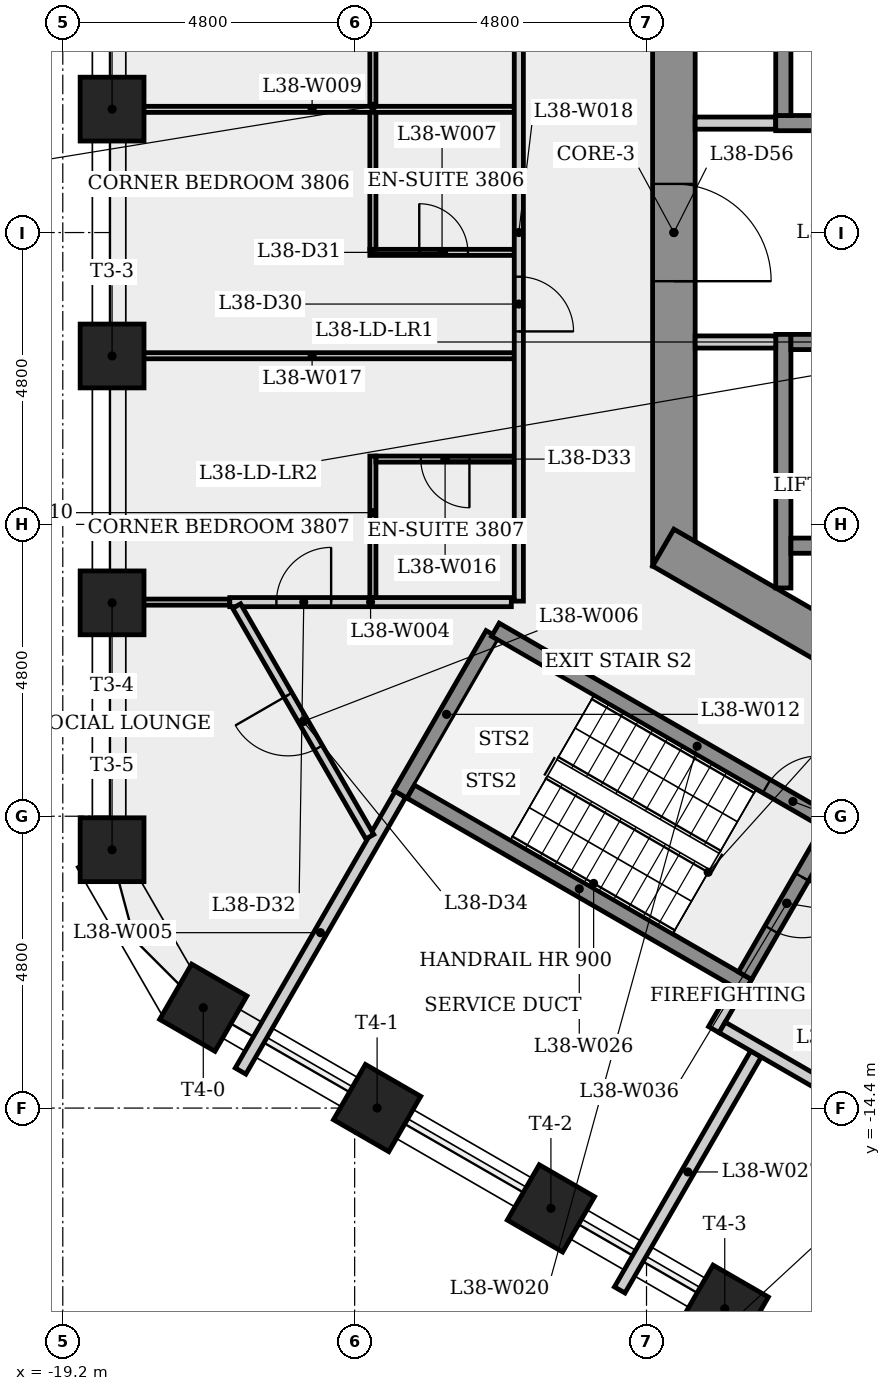
"""IFC4 building model, lengths in metres.
Left out: names, types, materials, properties, quantities, classifications, styles, units other than length and angle.
Written with IfcOpenShell. Run it as: python <this file> out.ifc"""

import sys

from ifc_helpers import new_model, si_unit, direction, frame, frame_2d, origin, origin_2d, place, context, subcontext, project, spatial, rectangle, extrude, element, fill, save


model = new_model("IFC4")
c1 = context("Model", 3, precision=1e-05, world=origin(), true_north=direction((0.0, 1.0)))
c2 = subcontext(c1, "Body", "Model", "MODEL_VIEW")
j1 = project(units=[si_unit("LENGTHUNIT", "METRE"), si_unit("PLANEANGLEUNIT", "RADIAN")], contexts=[c1])
p1 = place(None, origin())
s1 = spatial("IfcSite", under=j1, at=p1, CompositionType="ELEMENT")
p2 = place(p1, origin())
s2 = spatial("IfcBuilding", under=s1, at=p2, CompositionType="ELEMENT")
p3 = place(p2, frame((0.0, 0.0, 143.9)))
s3 = spatial("IfcBuildingStorey", under=s2, at=p3, CompositionType="ELEMENT", Elevation=143.9)
p4 = place(p3, frame((-9.15, 5.485, 0.0), z_axis=(0.0, 0.0, 1.0), x_axis=(0.0, -1.0, 0.0)))
e1 = element("IfcWall", 1, at=p4, inside=s3, PredefinedType="SHEAR", context=c2, shape_type="SweptSolid", body=[
    extrude(rectangle(XDim=10.97, YDim=0.7, at=frame_2d((5.485, 0.0))), origin(), (0.0, 0.0, 1.0), 4.0),
])
p5 = place(p4, frame((4.685, 0.0, 0.0)))
e2 = element("IfcOpeningElement", 2, at=p5, cuts=e1, PredefinedType="OPENING", context=c2, shape_type="SweptSolid", body=[
    extrude(rectangle(XDim=1.6, YDim=2.1, at=frame_2d((0.8, 1.05))), frame((0.0, 0.36, 0.0), z_axis=(0.0, -1.0, 0.0), x_axis=(1.0, 0.0, 0.0)), (0.0, 0.0, 1.0), 0.72),
])
p6 = place(p3, frame((-9.325, -5.182, 0.0), z_axis=(0.0, 0.0, 1.0), x_axis=(0.866023993627, -0.500002442456, 0.0)))
e3 = element("IfcWall", 3, at=p6, inside=s3, PredefinedType="SHEAR", context=c2, shape_type="SweptSolid", body=[
    extrude(rectangle(XDim=10.97, YDim=0.7, at=frame_2d((5.485, 0.0))), origin(), (0.0, 0.0, 1.0), 4.0),
])
p7 = place(p6, frame((5.682, 0.0, 0.0)))
e4 = element("IfcOpeningElement", 4, at=p7, cuts=e3, PredefinedType="OPENING", context=c2, shape_type="SweptSolid", body=[
    extrude(rectangle(XDim=0.9, YDim=2.1, at=frame_2d((0.45, 1.05))), frame((0.0, 0.36, 0.0), z_axis=(0.0, -1.0, 0.0), x_axis=(1.0, 0.0, 0.0)), (0.0, 0.0, 1.0), 0.72),
])
for number, where, z_axis, x_axis in (
    (5, (-18.389, 2.03, 0.0), (0.0, 0.0, 1.0), (-1.0, 0.0, 0.0)),
    (6, (-18.389, -2.03, 0.0), (0.0, 0.0, 1.0), (-1.0, 0.0, 0.0)),
    (7, (-18.389, -6.091, 0.0), (0.0, 0.0, 1.0), (-1.0, 0.0, 0.0)),
    (8, (-18.389, -10.151, 0.0), (0.0, 0.0, 1.0), (-1.0, 0.0, 0.0)),
    (9, (-16.889, -12.749, 0.0), (0.0, 0.0, 1.0), (-0.5, -0.866, 0.0)),
    (10, (-14.031, -14.399, 0.0), (0.0, 0.0, 1.0), (-0.5, -0.866, 0.0)),
    (11, (-11.172, -16.05, 0.0), (0.0, 0.0, 1.0), (-0.5, -0.866, 0.0)),
    (12, (-8.313, -17.7, 0.0), (0.0, 0.0, 1.0), (-0.5, -0.866, 0.0)),
):
    element("IfcColumn", number, at=place(p3, frame(where, z_axis=z_axis, x_axis=x_axis)), inside=s3, PredefinedType="COLUMN", context=c2, shape_type="SweptSolid", body=[
        extrude(rectangle(XDim=1.05, YDim=1.05, at=origin_2d()), origin(), (0.0, 0.0, 1.0), 4.0),
    ])
p8 = place(p3, frame((-16.453, -6.078, 0.0), z_axis=(0.0, 0.0, 1.0), x_axis=(-1.0, 0.0, 0.0)))
e13 = element("IfcWall", 13, at=p8, inside=s3, PredefinedType="PARTITIONING", context=c2, shape_type="SweptSolid", body=[
    extrude(rectangle(XDim=1.971, YDim=0.1, at=frame_2d((0.986, 0.0))), origin(), (0.0, 0.0, 1.0), 3.6),
])
p9 = place(p3, frame((-16.453, -6.078, 0.0), z_axis=(0.0, 0.0, 1.0), x_axis=(1.0, 0.0, 0.0)))
e14 = element("IfcWall", 14, at=p9, inside=s3, PredefinedType="PARTITIONING", context=c2, shape_type="SweptSolid", body=[
    extrude(rectangle(XDim=4.63, YDim=0.15, at=frame_2d((2.315, 0.0))), origin(), (0.0, 0.0, 1.0), 3.6),
])
p10 = place(p9, frame((0.766, 0.0, 0.0)))
e15 = element("IfcOpeningElement", 15, at=p10, cuts=e14, PredefinedType="OPENING", context=c2, shape_type="SweptSolid", body=[
    extrude(rectangle(XDim=0.9, YDim=2.1, at=frame_2d((0.45, 1.05))), frame((0.0, 0.085, 0.0), z_axis=(0.0, -1.0, 0.0), x_axis=(1.0, 0.0, 0.0)), (0.0, 0.0, 1.0), 0.17),
])
p11 = place(p3, frame((-16.276, -13.791, 0.0), z_axis=(0.0, 0.0, 1.0), x_axis=(0.499970375258, 0.866042506961, 0.0)))
e16 = element("IfcWall", 16, at=p11, inside=s3, PredefinedType="PLUMBINGWALL", context=c2, shape_type="SweptSolid", body=[
    extrude(rectangle(XDim=5.257, YDim=0.2, at=frame_2d((2.628, 0.0))), origin(), (0.0, 0.0, 1.0), 3.6),
])
p12 = place(p3, frame((-14.151, -9.937, 0.0), z_axis=(0.0, 0.0, 1.0), x_axis=(-0.500029633093, 0.866008294434, 0.0)))
e17 = element("IfcWall", 17, at=p12, inside=s3, PredefinedType="PARTITIONING", context=c2, shape_type="SweptSolid", body=[
    extrude(rectangle(XDim=4.38, YDim=0.15, at=frame_2d((2.19, 0.0))), origin(), (0.0, 0.0, 1.0), 3.6),
])
p13 = place(p12, frame((1.69, 0.0, 0.0)))
e18 = element("IfcOpeningElement", 18, at=p13, cuts=e17, PredefinedType="OPENING", context=c2, shape_type="SweptSolid", body=[
    extrude(rectangle(XDim=1.0, YDim=2.1, at=frame_2d((0.5, 1.05))), frame((0.0, 0.085, 0.0), z_axis=(0.0, -1.0, 0.0), x_axis=(1.0, 0.0, 0.0)), (0.0, 0.0, 1.0), 0.17),
])
p14 = place(p3, frame((-14.15, -0.326, 0.0), z_axis=(0.0, 0.0, 1.0), x_axis=(1.0, 0.0, 0.0)))
e19 = element("IfcWall", 19, at=p14, inside=s3, PredefinedType="PARTITIONING", context=c2, shape_type="SweptSolid", body=[
    extrude(rectangle(XDim=2.375, YDim=0.1, at=frame_2d((1.188, 0.0))), origin(), (0.0, 0.0, 1.0), 3.6),
])
p15 = place(p14, frame((0.812, 0.0, 0.0)))
e20 = element("IfcOpeningElement", 20, at=p15, cuts=e19, PredefinedType="OPENING", context=c2, shape_type="SweptSolid", body=[
    extrude(rectangle(XDim=0.8, YDim=2.1, at=frame_2d((0.4, 1.05))), frame((0.0, 0.06, 0.0), z_axis=(0.0, -1.0, 0.0), x_axis=(1.0, 0.0, 0.0)), (0.0, 0.0, 1.0), 0.12),
])
p16 = place(p3, frame((-14.1, -0.276, 0.0), z_axis=(0.0, 0.0, 1.0), x_axis=(0.0, 1.0, 0.0)))
e21 = element("IfcWall", 21, at=p16, inside=s3, PredefinedType="PARTITIONING", context=c2, shape_type="SweptSolid", body=[
    extrude(rectangle(XDim=4.705, YDim=0.1, at=frame_2d((2.352, 0.0))), origin(), (0.0, 0.0, 1.0), 3.6),
])
p17 = place(p3, frame((-18.424, 2.026, 0.0), z_axis=(0.0, 0.0, 1.0), x_axis=(1.0, 0.0, 0.0)))
e22 = element("IfcWall", 22, at=p17, inside=s3, PredefinedType="PARTITIONING", context=c2, shape_type="SweptSolid", body=[
    extrude(rectangle(XDim=6.649, YDim=0.1, at=frame_2d((3.325, 0.0))), origin(), (0.0, 0.0, 1.0), 3.6),
])
p18 = place(p3, frame((-14.1, -3.676, 0.0), z_axis=(0.0, 0.0, 1.0), x_axis=(0.0, -1.0, 0.0)))
e23 = element("IfcWall", 23, at=p18, inside=s3, PredefinedType="PARTITIONING", context=c2, shape_type="SweptSolid", body=[
    extrude(rectangle(XDim=2.327, YDim=0.1, at=frame_2d((1.164, 0.0))), origin(), (0.0, 0.0, 1.0), 3.6),
])
p19 = place(p3, frame((-13.648, -9.239, 0.0), z_axis=(0.0, 0.0, 1.0), x_axis=(0.50000556753, 0.866022189346, 0.0)))
e24 = element("IfcWall", 24, at=p19, inside=s3, PredefinedType="SHEAR", context=c2, shape_type="SweptSolid", body=[
    extrude(rectangle(XDim=3.036, YDim=0.25, at=frame_2d((1.518, 0.0))), origin(), (0.0, 0.0, 1.0), 3.6),
])
p20 = place(p3, frame((-12.085, -6.532, 0.0), z_axis=(0.0, 0.0, 1.0), x_axis=(0.86604373436, -0.499968249168, 0.0)))
e25 = element("IfcWall", 25, at=p20, inside=s3, PredefinedType="SHEAR", context=c2, shape_type="SweptSolid", body=[
    extrude(rectangle(XDim=1.118, YDim=0.25, at=frame_2d((0.559, 0.0))), origin(), (0.0, 0.0, 1.0), 3.6),
])
p21 = place(p3, frame((-11.775, -3.726, 0.0), z_axis=(0.0, 0.0, 1.0), x_axis=(-1.0, 0.0, 0.0)))
e26 = element("IfcWall", 26, at=p21, inside=s3, PredefinedType="PARTITIONING", context=c2, shape_type="SweptSolid", body=[
    extrude(rectangle(XDim=2.275, YDim=0.1, at=frame_2d((1.138, 0.0))), origin(), (0.0, 0.0, 1.0), 3.6),
])
p22 = place(p21, frame((0.738, 0.0, 0.0)))
e27 = element("IfcOpeningElement", 27, at=p22, cuts=e26, PredefinedType="OPENING", context=c2, shape_type="SweptSolid", body=[
    extrude(rectangle(XDim=0.8, YDim=2.1, at=frame_2d((0.4, 1.05))), frame((0.0, 0.06, 0.0), z_axis=(0.0, -1.0, 0.0), x_axis=(1.0, 0.0, 0.0)), (0.0, 0.0, 1.0), 0.12),
])
p23 = place(p3, frame((-11.775, -2.026, 0.0), z_axis=(0.0, 0.0, 1.0), x_axis=(-1.0, 0.0, 0.0)))
e28 = element("IfcWall", 28, at=p23, inside=s3, PredefinedType="PARTITIONING", context=c2, shape_type="SweptSolid", body=[
    extrude(rectangle(XDim=6.649, YDim=0.1, at=frame_2d((3.325, 0.0))), origin(), (0.0, 0.0, 1.0), 3.6),
])
p24 = place(p3, frame((-11.7, 6.062, 0.0), z_axis=(0.0, 0.0, 1.0), x_axis=(0.0, -1.0, 0.0)))
e29 = element("IfcWall", 29, at=p24, inside=s3, PredefinedType="PARTITIONING", context=c2, shape_type="SweptSolid", body=[
    extrude(rectangle(XDim=12.125, YDim=0.15, at=frame_2d((6.062, 0.0))), origin(), (0.0, 0.0, 1.0), 3.6),
])
p25 = place(p24, frame((6.788, 0.0, 0.0)))
e30 = element("IfcOpeningElement", 30, at=p25, cuts=e29, PredefinedType="OPENING", context=c2, shape_type="SweptSolid", body=[
    extrude(rectangle(XDim=0.9, YDim=2.1, at=frame_2d((0.45, 1.05))), frame((0.0, 0.085, 0.0), z_axis=(0.0, -1.0, 0.0), x_axis=(1.0, 0.0, 0.0)), (0.0, 0.0, 1.0), 0.17),
])
p26 = place(p3, frame((-11.1, -7.101, 0.0), z_axis=(0.0, 0.0, 1.0), x_axis=(0.866028615007, -0.499994437958, 0.0)))
e31 = element("IfcWall", 31, at=p26, inside=s3, PredefinedType="SHEAR", context=c2, shape_type="SweptSolid", body=[
    extrude(rectangle(XDim=5.387, YDim=0.25, at=frame_2d((2.694, 0.0))), origin(), (0.0, 0.0, 1.0), 3.6),
])
p27 = place(p26, frame((4.012, 0.0, 0.0)))
e32 = element("IfcOpeningElement", 32, at=p27, cuts=e31, PredefinedType="OPENING", context=c2, shape_type="SweptSolid", body=[
    extrude(rectangle(XDim=1.0, YDim=2.1, at=frame_2d((0.5, 1.05))), frame((0.0, 0.135, 0.0), z_axis=(0.0, -1.0, 0.0), x_axis=(1.0, 0.0, 0.0)), (0.0, 0.0, 1.0), 0.27),
])
p28 = place(p3, frame((-8.8, 1.8, 0.0), z_axis=(0.0, 0.0, 1.0), x_axis=(1.0, 0.0, 0.0)))
e33 = element("IfcWall", 33, at=p28, inside=s3, PredefinedType="PARTITIONING", context=c2, shape_type="SweptSolid", body=[
    extrude(rectangle(XDim=1.325, YDim=0.2, at=frame_2d((0.663, 0.0))), origin(), (0.0, 0.0, 1.0), 3.6),
])
p29 = place(p3, frame((-8.493, -13.11, 0.0), z_axis=(0.0, 0.0, 1.0), x_axis=(0.500067724834, 0.865986299303, 0.0)))
e34 = element("IfcWall", 34, at=p29, inside=s3, PredefinedType="PLUMBINGWALL", context=c2, shape_type="SweptSolid", body=[
    extrude(rectangle(XDim=0.775, YDim=0.2, at=frame_2d((0.388, 0.0))), origin(), (0.0, 0.0, 1.0), 3.6),
])
p30 = place(p3, frame((-7.935, -12.393, 0.0), z_axis=(0.0, 0.0, 1.0), x_axis=(-0.866025499775, 0.499999833739, 0.0)))
e35 = element("IfcWall", 35, at=p30, inside=s3, PredefinedType="SHEAR", context=c2, shape_type="SweptSolid", body=[
    extrude(rectangle(XDim=6.4, YDim=0.25, at=frame_2d((3.2, 0.0))), origin(), (0.0, 0.0, 1.0), 3.6),
])
p31 = place(p3, frame((-7.8, -13.51, 0.0), z_axis=(0.0, 0.0, 1.0), x_axis=(-0.499994393058, -0.866028640929, 0.0)))
e36 = element("IfcWall", 36, at=p31, inside=s3, PredefinedType="PLUMBINGWALL", context=c2, shape_type="SweptSolid", body=[
    extrude(rectangle(XDim=4.481, YDim=0.2, at=frame_2d((2.241, 0.0))), origin(), (0.0, 0.0, 1.0), 3.6),
])
p32 = place(p3, frame((-8.356, -13.073, 0.0), z_axis=(0.0, 0.0, 1.0), x_axis=(0.866038532462, -0.499977259774, 0.0)))
e37 = element("IfcWall", 37, at=p32, inside=s3, PredefinedType="PLUMBINGWALL", context=c2, shape_type="SweptSolid", body=[
    extrude(rectangle(XDim=4.7, YDim=0.2, at=frame_2d((2.35, 0.0))), origin(), (0.0, 0.0, 1.0), 3.6),
])
p33 = place(p3, frame((-7.475, 1.8, 0.0), z_axis=(0.0, 0.0, 1.0), x_axis=(1.0, 0.0, 0.0)))
e38 = element("IfcWall", 38, at=p33, inside=s3, PredefinedType="SHEAR", context=c2, shape_type="SweptSolid", body=[
    extrude(rectangle(XDim=14.95, YDim=0.25, at=frame_2d((7.475, 0.0))), origin(), (0.0, 0.0, 1.0), 3.6),
])
p34 = place(p33, frame((0.8, 0.0, 0.0)))
e39 = element("IfcOpeningElement", 39, at=p34, cuts=e38, PredefinedType="OPENING", context=c2, shape_type="SweptSolid", body=[
    extrude(rectangle(XDim=1.1, YDim=2.1, at=frame_2d((0.55, 1.05))), frame((0.0, 0.135, 0.0), z_axis=(0.0, -1.0, 0.0), x_axis=(1.0, 0.0, 0.0)), (0.0, 0.0, 1.0), 0.27),
])
p35 = place(p33, frame((3.25, 0.0, 0.0)))
e40 = element("IfcOpeningElement", 40, at=p35, cuts=e38, PredefinedType="OPENING", context=c2, shape_type="SweptSolid", body=[
    extrude(rectangle(XDim=1.1, YDim=2.1, at=frame_2d((0.55, 1.05))), frame((0.0, 0.135, 0.0), z_axis=(0.0, -1.0, 0.0), x_axis=(1.0, 0.0, 0.0)), (0.0, 0.0, 1.0), 0.27),
])
p36 = place(p33, frame((5.7, 0.0, 0.0)))
e41 = element("IfcOpeningElement", 41, at=p36, cuts=e38, PredefinedType="OPENING", context=c2, shape_type="SweptSolid", body=[
    extrude(rectangle(XDim=1.1, YDim=2.1, at=frame_2d((0.55, 1.05))), frame((0.0, 0.135, 0.0), z_axis=(0.0, -1.0, 0.0), x_axis=(1.0, 0.0, 0.0)), (0.0, 0.0, 1.0), 0.27),
])
p37 = place(p33, frame((8.15, 0.0, 0.0)))
e42 = element("IfcOpeningElement", 42, at=p37, cuts=e38, PredefinedType="OPENING", context=c2, shape_type="SweptSolid", body=[
    extrude(rectangle(XDim=1.1, YDim=2.1, at=frame_2d((0.55, 1.05))), frame((0.0, 0.135, 0.0), z_axis=(0.0, -1.0, 0.0), x_axis=(1.0, 0.0, 0.0)), (0.0, 0.0, 1.0), 0.27),
])
p38 = place(p33, frame((10.6, 0.0, 0.0)))
e43 = element("IfcOpeningElement", 43, at=p38, cuts=e38, PredefinedType="OPENING", context=c2, shape_type="SweptSolid", body=[
    extrude(rectangle(XDim=1.1, YDim=2.1, at=frame_2d((0.55, 1.05))), frame((0.0, 0.135, 0.0), z_axis=(0.0, -1.0, 0.0), x_axis=(1.0, 0.0, 0.0)), (0.0, 0.0, 1.0), 0.27),
])
p39 = place(p33, frame((13.05, 0.0, 0.0)))
e44 = element("IfcOpeningElement", 44, at=p39, cuts=e38, PredefinedType="OPENING", context=c2, shape_type="SweptSolid", body=[
    extrude(rectangle(XDim=1.1, YDim=2.1, at=frame_2d((0.55, 1.05))), frame((0.0, 0.135, 0.0), z_axis=(0.0, -1.0, 0.0), x_axis=(1.0, 0.0, 0.0)), (0.0, 0.0, 1.0), 0.27),
])
p40 = place(p3, frame((-7.35, -5.846, 0.0), z_axis=(0.0, 0.0, 1.0), x_axis=(0.0, 1.0, 0.0)))
e45 = element("IfcWall", 45, at=p40, inside=s3, PredefinedType="SHEAR", context=c2, shape_type="SweptSolid", body=[
    extrude(rectangle(XDim=4.171, YDim=0.25, at=frame_2d((2.085, 0.0))), origin(), (0.0, 0.0, 1.0), 3.6),
])
p41 = place(p3, frame((-7.35, 1.925, 0.0), z_axis=(0.0, 0.0, 1.0), x_axis=(0.0, 1.0, 0.0)))
e46 = element("IfcWall", 46, at=p41, inside=s3, PredefinedType="SHEAR", context=c2, shape_type="SweptSolid", body=[
    extrude(rectangle(XDim=3.921, YDim=0.25, at=frame_2d((1.96, 0.0))), origin(), (0.0, 0.0, 1.0), 3.6),
])
p42 = place(p3, frame((-7.475, -1.8, 0.0), z_axis=(0.0, 0.0, 1.0), x_axis=(-1.0, 0.0, 0.0)))
e47 = element("IfcWall", 47, at=p42, inside=s3, PredefinedType="PARTITIONING", context=c2, shape_type="SweptSolid", body=[
    extrude(rectangle(XDim=1.325, YDim=0.2, at=frame_2d((0.663, 0.0))), origin(), (0.0, 0.0, 1.0), 3.6),
])
p43 = place(p3, frame((-6.605, -9.841, 0.0), z_axis=(0.0, 0.0, 1.0), x_axis=(-0.499996545922, -0.866027397988, 0.0)))
e48 = element("IfcWall", 48, at=p43, inside=s3, PredefinedType="SHEAR", context=c2, shape_type="SweptSolid", body=[
    extrude(rectangle(XDim=2.75, YDim=0.25, at=frame_2d((1.375, 0.0))), origin(), (0.0, 0.0, 1.0), 3.6),
])
p44 = place(p43, frame((0.875, 0.0, 0.0)))
e49 = element("IfcOpeningElement", 49, at=p44, cuts=e48, PredefinedType="OPENING", context=c2, shape_type="SweptSolid", body=[
    extrude(rectangle(XDim=1.0, YDim=2.1, at=frame_2d((0.5, 1.05))), frame((0.0, 0.135, 0.0), z_axis=(0.0, -1.0, 0.0), x_axis=(1.0, 0.0, 0.0)), (0.0, 0.0, 1.0), 0.27),
])
p45 = place(p3, frame((-7.225, -5.15, 0.0), z_axis=(0.0, 0.0, 1.0), x_axis=(1.0, 0.0, 0.0)))
e50 = element("IfcWall", 50, at=p45, inside=s3, PredefinedType="SHEAR", context=c2, shape_type="SweptSolid", body=[
    extrude(rectangle(XDim=14.7, YDim=0.25, at=frame_2d((7.35, 0.0))), origin(), (0.0, 0.0, 1.0), 3.6),
])
p46 = place(p3, frame((-7.225, -1.8, 0.0), z_axis=(0.0, 0.0, 1.0), x_axis=(1.0, 0.0, 0.0)))
e51 = element("IfcWall", 51, at=p46, inside=s3, PredefinedType="SHEAR", context=c2, shape_type="SweptSolid", body=[
    extrude(rectangle(XDim=14.7, YDim=0.25, at=frame_2d((7.35, 0.0))), origin(), (0.0, 0.0, 1.0), 3.6),
])
p47 = place(p46, frame((0.597, 0.0, 0.0)))
e52 = element("IfcOpeningElement", 52, at=p47, cuts=e51, PredefinedType="OPENING", context=c2, shape_type="SweptSolid", body=[
    extrude(rectangle(XDim=1.1, YDim=2.1, at=frame_2d((0.55, 1.05))), frame((0.0, 0.135, 0.0), z_axis=(0.0, -1.0, 0.0), x_axis=(1.0, 0.0, 0.0)), (0.0, 0.0, 1.0), 0.27),
])
p48 = place(p46, frame((3.0, 0.0, 0.0)))
e53 = element("IfcOpeningElement", 53, at=p48, cuts=e51, PredefinedType="OPENING", context=c2, shape_type="SweptSolid", body=[
    extrude(rectangle(XDim=1.1, YDim=2.1, at=frame_2d((0.55, 1.05))), frame((0.0, 0.135, 0.0), z_axis=(0.0, -1.0, 0.0), x_axis=(1.0, 0.0, 0.0)), (0.0, 0.0, 1.0), 0.27),
])
p49 = place(p46, frame((5.45, 0.0, 0.0)))
e54 = element("IfcOpeningElement", 54, at=p49, cuts=e51, PredefinedType="OPENING", context=c2, shape_type="SweptSolid", body=[
    extrude(rectangle(XDim=1.1, YDim=2.1, at=frame_2d((0.55, 1.05))), frame((0.0, 0.135, 0.0), z_axis=(0.0, -1.0, 0.0), x_axis=(1.0, 0.0, 0.0)), (0.0, 0.0, 1.0), 0.27),
])
p50 = place(p46, frame((7.9, 0.0, 0.0)))
e55 = element("IfcOpeningElement", 55, at=p50, cuts=e51, PredefinedType="OPENING", context=c2, shape_type="SweptSolid", body=[
    extrude(rectangle(XDim=1.1, YDim=2.1, at=frame_2d((0.55, 1.05))), frame((0.0, 0.135, 0.0), z_axis=(0.0, -1.0, 0.0), x_axis=(1.0, 0.0, 0.0)), (0.0, 0.0, 1.0), 0.27),
])
p51 = place(p46, frame((10.35, 0.0, 0.0)))
e56 = element("IfcOpeningElement", 56, at=p51, cuts=e51, PredefinedType="OPENING", context=c2, shape_type="SweptSolid", body=[
    extrude(rectangle(XDim=1.1, YDim=2.1, at=frame_2d((0.55, 1.05))), frame((0.0, 0.135, 0.0), z_axis=(0.0, -1.0, 0.0), x_axis=(1.0, 0.0, 0.0)), (0.0, 0.0, 1.0), 0.27),
])
p52 = place(p27, origin())
e57 = element("IfcDoor", 57, at=p52, inside=s3, OperationType="SINGLE_SWING_RIGHT", PredefinedType="DOOR", context=c2, shape_type="SweptSolid", body=[
    extrude(rectangle(XDim=1.0, YDim=2.1, at=frame_2d((0.5, 1.05))), frame((0.0, 0.025, 0.0), z_axis=(0.0, -1.0, 0.0), x_axis=(1.0, 0.0, 0.0)), (0.0, 0.0, 1.0), 0.05),
])
fill(e32, e57)
p53 = place(p44, origin())
e58 = element("IfcDoor", 58, at=p53, inside=s3, OperationType="SINGLE_SWING_LEFT", PredefinedType="DOOR", context=c2, shape_type="SweptSolid", body=[
    extrude(rectangle(XDim=1.0, YDim=2.1, at=frame_2d((0.5, 1.05))), frame((0.0, 0.025, 0.0), z_axis=(0.0, -1.0, 0.0), x_axis=(1.0, 0.0, 0.0)), (0.0, 0.0, 1.0), 0.05),
])
fill(e49, e58)
p54 = place(p25, origin())
e59 = element("IfcDoor", 59, at=p54, inside=s3, OperationType="SINGLE_SWING_RIGHT", PredefinedType="DOOR", context=c2, shape_type="SweptSolid", body=[
    extrude(rectangle(XDim=0.9, YDim=2.1, at=frame_2d((0.45, 1.05))), frame((0.0, 0.025, 0.0), z_axis=(0.0, -1.0, 0.0), x_axis=(1.0, 0.0, 0.0)), (0.0, 0.0, 1.0), 0.05),
])
fill(e30, e59)
p55 = place(p15, origin())
e60 = element("IfcDoor", 60, at=p55, inside=s3, OperationType="SINGLE_SWING_LEFT", PredefinedType="DOOR", context=c2, shape_type="SweptSolid", body=[
    extrude(rectangle(XDim=0.8, YDim=2.1, at=frame_2d((0.4, 1.05))), frame((0.0, 0.025, 0.0), z_axis=(0.0, -1.0, 0.0), x_axis=(1.0, 0.0, 0.0)), (0.0, 0.0, 1.0), 0.05),
])
fill(e20, e60)
p56 = place(p10, origin())
e61 = element("IfcDoor", 61, at=p56, inside=s3, OperationType="SINGLE_SWING_RIGHT", PredefinedType="DOOR", context=c2, shape_type="SweptSolid", body=[
    extrude(rectangle(XDim=0.9, YDim=2.1, at=frame_2d((0.45, 1.05))), frame((0.0, 0.025, 0.0), z_axis=(0.0, -1.0, 0.0), x_axis=(1.0, 0.0, 0.0)), (0.0, 0.0, 1.0), 0.05),
])
fill(e15, e61)
p57 = place(p22, origin())
e62 = element("IfcDoor", 62, at=p57, inside=s3, OperationType="SINGLE_SWING_LEFT", PredefinedType="DOOR", context=c2, shape_type="SweptSolid", body=[
    extrude(rectangle(XDim=0.8, YDim=2.1, at=frame_2d((0.4, 1.05))), frame((0.0, 0.025, 0.0), z_axis=(0.0, -1.0, 0.0), x_axis=(1.0, 0.0, 0.0)), (0.0, 0.0, 1.0), 0.05),
])
fill(e27, e62)
p58 = place(p13, origin())
e63 = element("IfcDoor", 63, at=p58, inside=s3, OperationType="SINGLE_SWING_RIGHT", PredefinedType="DOOR", context=c2, shape_type="SweptSolid", body=[
    extrude(rectangle(XDim=1.0, YDim=2.1, at=frame_2d((0.5, 1.05))), frame((0.0, 0.025, 0.0), z_axis=(0.0, -1.0, 0.0), x_axis=(1.0, 0.0, 0.0)), (0.0, 0.0, 1.0), 0.05),
])
fill(e18, e63)
p59 = place(p5, origin())
e64 = element("IfcDoor", 64, at=p59, inside=s3, OperationType="SINGLE_SWING_RIGHT", PredefinedType="DOOR", context=c2, shape_type="SweptSolid", body=[
    extrude(rectangle(XDim=1.6, YDim=2.1, at=frame_2d((0.8, 1.05))), frame((0.0, 0.025, 0.0), z_axis=(0.0, -1.0, 0.0), x_axis=(1.0, 0.0, 0.0)), (0.0, 0.0, 1.0), 0.05),
])
fill(e2, e64)
save(model, sys.argv[1])
